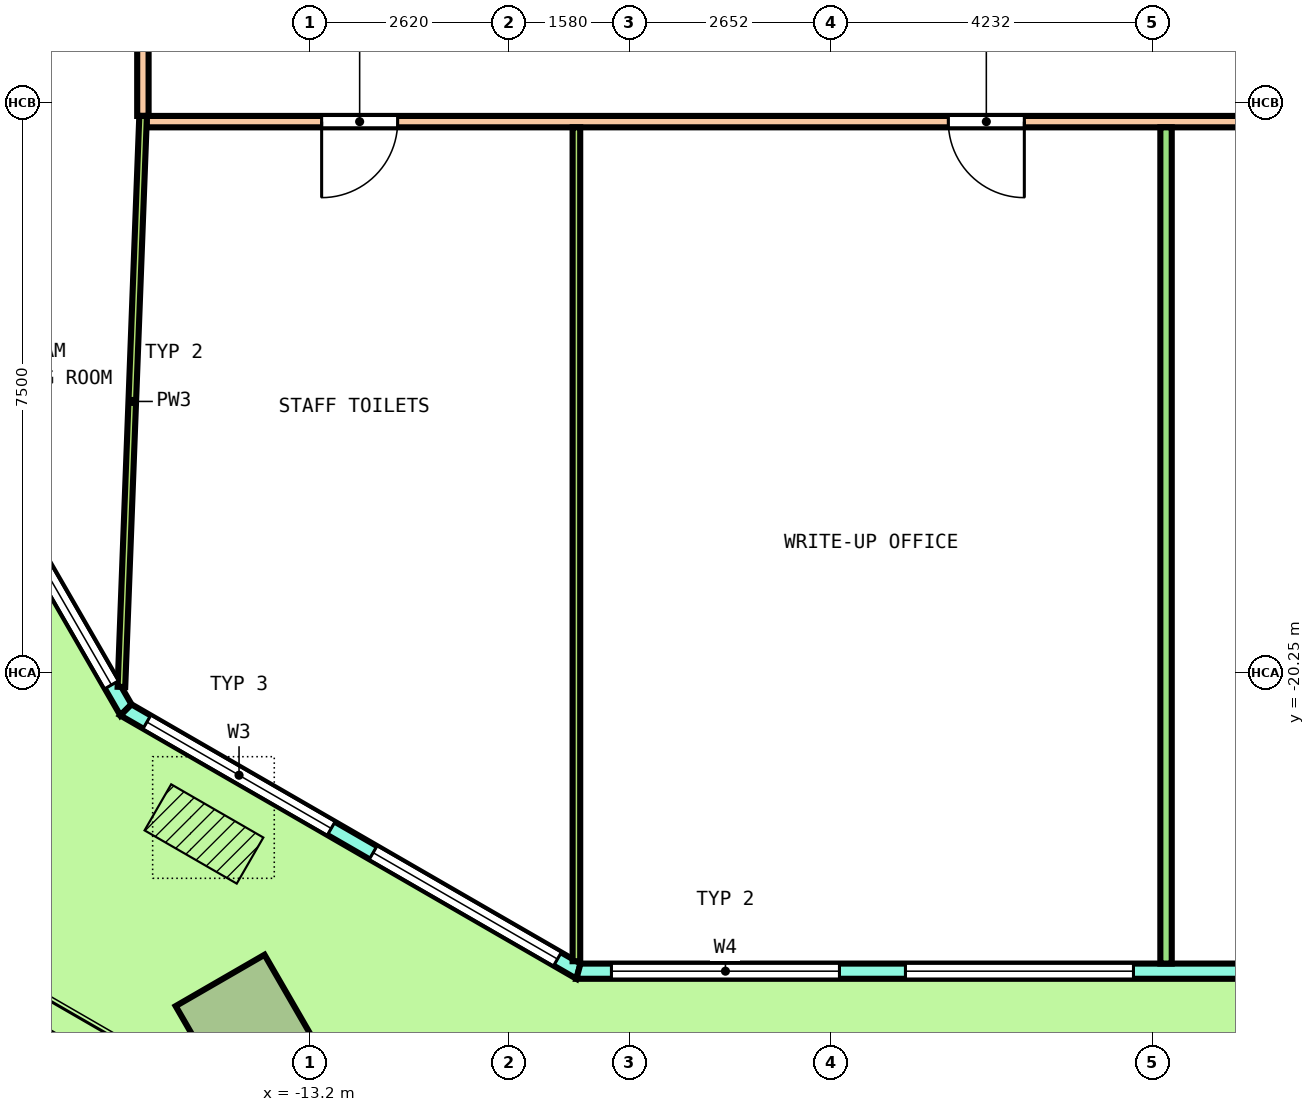
"""IFC4 building model, lengths in metres.
Left out: names, types, materials, properties, quantities, classifications, styles, units other than length and angle.
Written with IfcOpenShell. Run it as: python <this file> out.ifc"""

import sys

from ifc_helpers import new_model, si_unit, direction, frame, frame_2d, origin, origin_2d, place, context, subcontext, project, spatial, polyline, rectangle, outline, extrude, element, fill, save


model = new_model("IFC4")
c1 = context("Model", 3, precision=1e-05, world=origin(), true_north=direction((0.0, 1.0)))
c2 = subcontext(c1, "Body", "Model", "MODEL_VIEW")
j1 = project(units=[si_unit("LENGTHUNIT", "METRE"), si_unit("PLANEANGLEUNIT", "RADIAN")], contexts=[c1])
p1 = place(None, origin())
s1 = spatial("IfcSite", under=j1, at=p1, CompositionType="ELEMENT")
p2 = place(p1, origin())
s2 = spatial("IfcBuilding", under=s1, at=p2, CompositionType="ELEMENT")
p3 = place(p2, frame((0.0, 0.0, 89.6)))
s3 = spatial("IfcBuildingStorey", under=s2, at=p3, CompositionType="ELEMENT", Elevation=89.6)
p4 = place(p3, frame((-14.047, -24.883, 0.0), z_axis=(0.018133721723, -0.031387604711, 0.999342777233), x_axis=(0.86599921333, -0.499059227482, -0.031388691869)))
e1 = element("IfcColumn", 1, at=p4, inside=s3, PredefinedType="COLUMN", context=c2, shape_type="SweptSolid", body=[
    extrude(rectangle(XDim=1.35, YDim=1.35, at=origin_2d()), origin(), (0.0, 0.0, 1.0), 4.052),
])
p5 = place(p3, frame((-25.772, -3.161, 0.0), z_axis=(0.0, 0.0, 1.0), x_axis=(0.500001833672, -0.866024345111, 0.0)))
e2 = element("IfcWall", 2, at=p5, inside=s3, PredefinedType="SOLIDWALL", context=c2, shape_type="SweptSolid", body=[
    extrude(outline(polyline([(-0.027, -0.1), (0.991, -0.1), (2.008, -0.1), (3.026, -0.1), (4.043, -0.1), (5.061, -0.1), (6.079, -0.1), (7.096, -0.1), (8.114, -0.1), (9.131, -0.1), (10.149, -0.1), (11.167, -0.1), (12.184, -0.1), (13.202, -0.1), (14.219, -0.1), (15.237, -0.1), (16.254, -0.1), (17.272, -0.1), (18.29, -0.1), (19.307, -0.1), (20.325, -0.1), (20.271, 0.1), (19.259, 0.1), (18.247, 0.1), (17.234, 0.1), (16.222, 0.1), (15.21, 0.1), (14.198, 0.1), (13.186, 0.1), (12.173, 0.1), (11.161, 0.1), (10.149, 0.1), (9.137, 0.1), (8.125, 0.1), (7.112, 0.1), (6.1, 0.1), (5.088, 0.1), (4.076, 0.1), (3.063, 0.1), (2.051, 0.1), (1.039, 0.1), (0.027, 0.1), (-0.027, -0.1)])), origin(), (0.0, 0.0, 1.0), 4.1),
])
p6 = place(p5, frame((0.38, 0.0, 0.1)))
e3 = element("IfcOpeningElement", 3, at=p6, cuts=e2, PredefinedType="OPENING", context=c2, shape_type="SweptSolid", body=[
    extrude(rectangle(XDim=3.3, YDim=2.9, at=frame_2d((1.65, 1.45))), frame((0.0, 0.11, 0.0), z_axis=(0.0, -1.0, 0.0), x_axis=(1.0, 0.0, 0.0)), (0.0, 0.0, 1.0), 0.22),
])
p7 = place(p5, frame((4.439, 0.0, 0.1)))
e4 = element("IfcOpeningElement", 4, at=p7, cuts=e2, PredefinedType="OPENING", context=c2, shape_type="SweptSolid", body=[
    extrude(rectangle(XDim=3.3, YDim=2.9, at=frame_2d((1.65, 1.45))), frame((0.0, 0.11, 0.0), z_axis=(0.0, -1.0, 0.0), x_axis=(1.0, 0.0, 0.0)), (0.0, 0.0, 1.0), 0.22),
])
p8 = place(p5, frame((9.249, 0.0, 0.0)))
e5 = element("IfcOpeningElement", 5, at=p8, cuts=e2, PredefinedType="OPENING", context=c2, shape_type="SweptSolid", body=[
    extrude(rectangle(XDim=1.8, YDim=2.4, at=frame_2d((0.9, 1.2))), frame((0.0, 0.11, 0.0), z_axis=(0.0, -1.0, 0.0), x_axis=(1.0, 0.0, 0.0)), (0.0, 0.0, 1.0), 0.22),
])
p9 = place(p5, frame((9.249, 0.0, 2.55)))
e6 = element("IfcOpeningElement", 6, at=p9, cuts=e2, PredefinedType="OPENING", context=c2, shape_type="SweptSolid", body=[
    extrude(rectangle(XDim=1.8, YDim=0.45, at=frame_2d((0.9, 0.225))), frame((0.0, 0.11, 0.0), z_axis=(0.0, -1.0, 0.0), x_axis=(1.0, 0.0, 0.0)), (0.0, 0.0, 1.0), 0.22),
])
p10 = place(p5, frame((12.559, 0.0, 0.1)))
e7 = element("IfcOpeningElement", 7, at=p10, cuts=e2, PredefinedType="OPENING", context=c2, shape_type="SweptSolid", body=[
    extrude(rectangle(XDim=3.3, YDim=2.9, at=frame_2d((1.65, 1.45))), frame((0.0, 0.11, 0.0), z_axis=(0.0, -1.0, 0.0), x_axis=(1.0, 0.0, 0.0)), (0.0, 0.0, 1.0), 0.22),
])
p11 = place(p5, frame((16.618, 0.0, 0.1)))
e8 = element("IfcOpeningElement", 8, at=p11, cuts=e2, PredefinedType="OPENING", context=c2, shape_type="SweptSolid", body=[
    extrude(rectangle(XDim=3.3, YDim=2.9, at=frame_2d((1.65, 1.45))), frame((0.0, 0.11, 0.0), z_axis=(0.0, -1.0, 0.0), x_axis=(1.0, 0.0, 0.0)), (0.0, 0.0, 1.0), 0.22),
])
p12 = place(p3, frame((-15.624, -20.739, 0.0), z_axis=(0.0, 0.0, 1.0), x_axis=(0.866029458321, -0.49999297727, 0.0)))
e9 = element("IfcWall", 9, at=p12, inside=s3, PredefinedType="SOLIDWALL", context=c2, shape_type="SweptSolid", body=[
    extrude(outline(polyline([(-0.027, -0.1), (1.128, -0.1), (2.282, -0.1), (3.437, -0.1), (4.592, -0.1), (5.747, -0.1), (6.901, -0.1), (6.848, 0.1), (5.711, 0.1), (4.574, 0.1), (3.437, 0.1), (2.301, 0.1), (1.164, 0.1), (0.027, 0.1), (-0.027, -0.1)])), origin(), (0.0, 0.0, 1.0), 4.1),
])
p13 = place(p12, frame((0.319, 0.0, 0.1)))
e10 = element("IfcOpeningElement", 10, at=p13, cuts=e9, PredefinedType="OPENING", context=c2, shape_type="SweptSolid", body=[
    extrude(rectangle(XDim=2.8, YDim=2.9, at=frame_2d((1.4, 1.45))), frame((0.0, 0.11, 0.0), z_axis=(0.0, -1.0, 0.0), x_axis=(1.0, 0.0, 0.0)), (0.0, 0.0, 1.0), 0.22),
])
p14 = place(p12, frame((3.756, 0.0, 0.1)))
e11 = element("IfcOpeningElement", 11, at=p14, cuts=e9, PredefinedType="OPENING", context=c2, shape_type="SweptSolid", body=[
    extrude(rectangle(XDim=2.8, YDim=2.9, at=frame_2d((1.4, 1.45))), frame((0.0, 0.11, 0.0), z_axis=(0.0, -1.0, 0.0), x_axis=(1.0, 0.0, 0.0)), (0.0, 0.0, 1.0), 0.22),
])
p15 = place(p3, frame((-9.67, -24.177, 0.0), z_axis=(0.0, 0.0, 1.0), x_axis=(1.0, 0.0, 0.0)))
e12 = element("IfcWall", 12, at=p15, inside=s3, PredefinedType="SOLIDWALL", context=c2, shape_type="SweptSolid", body=[
    extrude(outline(polyline([(-0.027, -0.1), (0.994, -0.1), (2.015, -0.1), (3.035, -0.1), (4.056, -0.1), (5.077, -0.1), (6.097, -0.1), (7.118, -0.1), (8.139, -0.1), (9.16, -0.1), (10.18, -0.1), (11.201, -0.1), (12.222, -0.1), (13.242, -0.1), (14.263, -0.1), (15.284, -0.1), (16.304, -0.1), (17.325, -0.1), (18.346, -0.1), (19.367, -0.1), (19.313, 0.1), (18.298, 0.1), (17.283, 0.1), (16.268, 0.1), (15.253, 0.1), (14.238, 0.1), (13.223, 0.1), (12.208, 0.1), (11.193, 0.1), (10.177, 0.1), (9.162, 0.1), (8.147, 0.1), (7.132, 0.1), (6.117, 0.1), (5.102, 0.1), (4.087, 0.1), (3.072, 0.1), (2.057, 0.1), (1.042, 0.1), (0.027, 0.1), (-0.027, -0.1)])), origin(), (0.0, 0.0, 1.0), 4.1),
])
p16 = place(p15, frame((0.434, 0.0, 0.1)))
e13 = element("IfcOpeningElement", 13, at=p16, cuts=e12, PredefinedType="OPENING", context=c2, shape_type="SweptSolid", body=[
    extrude(rectangle(XDim=3.0, YDim=2.9, at=frame_2d((1.5, 1.45))), frame((0.0, 0.11, 0.0), z_axis=(0.0, -1.0, 0.0), x_axis=(1.0, 0.0, 0.0)), (0.0, 0.0, 1.0), 0.22),
])
p17 = place(p15, frame((4.302, 0.0, 0.1)))
e14 = element("IfcOpeningElement", 14, at=p17, cuts=e12, PredefinedType="OPENING", context=c2, shape_type="SweptSolid", body=[
    extrude(rectangle(XDim=3.0, YDim=2.9, at=frame_2d((1.5, 1.45))), frame((0.0, 0.11, 0.0), z_axis=(0.0, -1.0, 0.0), x_axis=(1.0, 0.0, 0.0)), (0.0, 0.0, 1.0), 0.22),
])
p18 = place(p15, frame((8.77, 0.0, 0.0)))
e15 = element("IfcOpeningElement", 15, at=p18, cuts=e12, PredefinedType="OPENING", context=c2, shape_type="SweptSolid", body=[
    extrude(rectangle(XDim=1.8, YDim=2.4, at=frame_2d((0.9, 1.2))), frame((0.0, 0.11, 0.0), z_axis=(0.0, -1.0, 0.0), x_axis=(1.0, 0.0, 0.0)), (0.0, 0.0, 1.0), 0.22),
])
p19 = place(p15, frame((8.77, 0.0, 2.55)))
e16 = element("IfcOpeningElement", 16, at=p19, cuts=e12, PredefinedType="OPENING", context=c2, shape_type="SweptSolid", body=[
    extrude(rectangle(XDim=1.8, YDim=0.45, at=frame_2d((0.9, 0.225))), frame((0.0, 0.11, 0.0), z_axis=(0.0, -1.0, 0.0), x_axis=(1.0, 0.0, 0.0)), (0.0, 0.0, 1.0), 0.22),
])
p20 = place(p15, frame((12.038, 0.0, 0.1)))
e17 = element("IfcOpeningElement", 17, at=p20, cuts=e12, PredefinedType="OPENING", context=c2, shape_type="SweptSolid", body=[
    extrude(rectangle(XDim=3.0, YDim=2.9, at=frame_2d((1.5, 1.45))), frame((0.0, 0.11, 0.0), z_axis=(0.0, -1.0, 0.0), x_axis=(1.0, 0.0, 0.0)), (0.0, 0.0, 1.0), 0.22),
])
p21 = place(p15, frame((15.906, 0.0, 0.1)))
e18 = element("IfcOpeningElement", 18, at=p21, cuts=e12, PredefinedType="OPENING", context=c2, shape_type="SweptSolid", body=[
    extrude(rectangle(XDim=3.0, YDim=2.9, at=frame_2d((1.5, 1.45))), frame((0.0, 0.11, 0.0), z_axis=(0.0, -1.0, 0.0), x_axis=(1.0, 0.0, 0.0)), (0.0, 0.0, 1.0), 0.22),
])
p22 = place(p3, frame((-15.4, -12.925, 0.0), z_axis=(0.0, 0.0, 1.0), x_axis=(0.0, 1.0, 0.0)))
e19 = element("IfcWall", 19, at=p22, inside=s3, PredefinedType="PARTITIONING", context=c2, shape_type="SweptSolid", body=[
    extrude(rectangle(XDim=25.85, YDim=0.15, at=frame_2d((12.925, 0.0))), origin(), (0.0, 0.0, 1.0), 3.05),
])
p23 = place(p22, frame((21.375, 0.0, 0.0)))
e20 = element("IfcOpeningElement", 20, at=p23, cuts=e19, PredefinedType="OPENING", context=c2, shape_type="SweptSolid", body=[
    extrude(rectangle(XDim=1.2, YDim=2.1, at=frame_2d((0.6, 1.05))), frame((0.0, 0.085, 0.0), z_axis=(0.0, -1.0, 0.0), x_axis=(1.0, 0.0, 0.0)), (0.0, 0.0, 1.0), 0.17),
])
p24 = place(p22, frame((15.497, 0.0, 0.0)))
e21 = element("IfcOpeningElement", 21, at=p24, cuts=e19, PredefinedType="OPENING", context=c2, shape_type="SweptSolid", body=[
    extrude(rectangle(XDim=1.2, YDim=2.1, at=frame_2d((0.6, 1.05))), frame((0.0, 0.085, 0.0), z_axis=(0.0, -1.0, 0.0), x_axis=(1.0, 0.0, 0.0)), (0.0, 0.0, 1.0), 0.17),
])
p25 = place(p22, frame((3.566, 0.0, 0.0)))
e22 = element("IfcOpeningElement", 22, at=p25, cuts=e19, PredefinedType="OPENING", context=c2, shape_type="SweptSolid", body=[
    extrude(rectangle(XDim=1.2, YDim=2.1, at=frame_2d((0.6, 1.05))), frame((0.0, 0.085, 0.0), z_axis=(0.0, -1.0, 0.0), x_axis=(1.0, 0.0, 0.0)), (0.0, 0.0, 1.0), 0.17),
])
p26 = place(p3, frame((-15.35, -13.0, 0.0), z_axis=(0.0, 0.0, 1.0), x_axis=(1.0, 0.0, 0.0)))
e23 = element("IfcWall", 23, at=p26, inside=s3, PredefinedType="PARTITIONING", context=c2, shape_type="SweptSolid", body=[
    extrude(rectangle(XDim=30.7, YDim=0.15, at=frame_2d((15.35, 0.0))), origin(), (0.0, 0.0, 1.0), 3.05),
])
p27 = place(p26, frame((2.302, 0.0, 0.0)))
e24 = element("IfcOpeningElement", 24, at=p27, cuts=e23, PredefinedType="OPENING", context=c2, shape_type="SweptSolid", body=[
    extrude(rectangle(XDim=1.0, YDim=2.1, at=frame_2d((0.5, 1.05))), frame((0.0, 0.085, 0.0), z_axis=(0.0, -1.0, 0.0), x_axis=(1.0, 0.0, 0.0)), (0.0, 0.0, 1.0), 0.17),
])
p28 = place(p26, frame((10.546, 0.0, 0.0)))
e25 = element("IfcOpeningElement", 25, at=p28, cuts=e23, PredefinedType="OPENING", context=c2, shape_type="SweptSolid", body=[
    extrude(rectangle(XDim=1.0, YDim=2.1, at=frame_2d((0.5, 1.05))), frame((0.0, 0.085, 0.0), z_axis=(0.0, -1.0, 0.0), x_axis=(1.0, 0.0, 0.0)), (0.0, 0.0, 1.0), 0.17),
])
p29 = place(p26, frame((15.225, 0.0, 0.0)))
e26 = element("IfcOpeningElement", 26, at=p29, cuts=e23, PredefinedType="OPENING", context=c2, shape_type="SweptSolid", body=[
    extrude(rectangle(XDim=1.2, YDim=2.1, at=frame_2d((0.6, 1.05))), frame((0.0, 0.085, 0.0), z_axis=(0.0, -1.0, 0.0), x_axis=(1.0, 0.0, 0.0)), (0.0, 0.0, 1.0), 0.17),
])
p30 = place(p26, frame((22.763, 0.0, 0.0)))
e27 = element("IfcOpeningElement", 27, at=p30, cuts=e23, PredefinedType="OPENING", context=c2, shape_type="SweptSolid", body=[
    extrude(rectangle(XDim=1.2, YDim=2.1, at=frame_2d((0.6, 1.05))), frame((0.0, 0.085, 0.0), z_axis=(0.0, -1.0, 0.0), x_axis=(1.0, 0.0, 0.0)), (0.0, 0.0, 1.0), 0.17),
])
p31 = place(p26, frame((28.748, 0.0, 0.0)))
e28 = element("IfcOpeningElement", 28, at=p31, cuts=e23, PredefinedType="OPENING", context=c2, shape_type="SweptSolid", body=[
    extrude(rectangle(XDim=1.0, YDim=2.1, at=frame_2d((0.5, 1.05))), frame((0.0, 0.085, 0.0), z_axis=(0.0, -1.0, 0.0), x_axis=(1.0, 0.0, 0.0)), (0.0, 0.0, 1.0), 0.17),
])
p32 = place(p3, frame((-1.939, -24.077, 0.0), z_axis=(0.0, 0.0, 1.0), x_axis=(0.0, 1.0, 0.0)))
e29 = element("IfcWall", 29, at=p32, inside=s3, PredefinedType="PARTITIONING", context=c2, shape_type="SweptSolid", body=[
    extrude(rectangle(XDim=11.002, YDim=0.15, at=frame_2d((5.501, 0.0))), origin(), (0.0, 0.0, 1.0), 3.05),
])
p33 = place(p3, frame((-15.683, -20.437, 0.0), z_axis=(0.0, 0.0, 1.0), x_axis=(0.03796539422, 0.99927905454, 0.0)))
e30 = element("IfcWall", 30, at=p33, inside=s3, PredefinedType="PARTITIONING", context=c2, shape_type="SweptSolid", body=[
    extrude(rectangle(XDim=7.517, YDim=0.1, at=frame_2d((3.759, 0.0))), origin(), (0.0, 0.0, 1.0), 3.05),
])
p34 = place(p3, frame((-9.697, -24.046, 0.0), z_axis=(0.0, 0.0, 1.0), x_axis=(0.0, 1.0, 0.0)))
e31 = element("IfcWall", 31, at=p34, inside=s3, PredefinedType="PARTITIONING", context=c2, shape_type="SweptSolid", body=[
    extrude(rectangle(XDim=10.971, YDim=0.1, at=frame_2d((5.485, 0.0))), origin(), (0.0, 0.0, 1.0), 3.05),
])
p35 = place(p11, origin())
e32 = element("IfcWindow", 32, at=p35, inside=s3, PartitioningType="SINGLE_PANEL", PredefinedType="WINDOW", context=c2, shape_type="SweptSolid", body=[
    extrude(rectangle(XDim=3.3, YDim=2.9, at=frame_2d((1.65, 1.45))), frame((0.0, 0.03, 0.0), z_axis=(0.0, -1.0, 0.0), x_axis=(1.0, 0.0, 0.0)), (0.0, 0.0, 1.0), 0.06),
])
fill(e8, e32)
p36 = place(p13, origin())
e33 = element("IfcWindow", 33, at=p36, inside=s3, PartitioningType="SINGLE_PANEL", PredefinedType="WINDOW", context=c2, shape_type="SweptSolid", body=[
    extrude(rectangle(XDim=2.8, YDim=2.9, at=frame_2d((1.4, 1.45))), frame((0.0, 0.03, 0.0), z_axis=(0.0, -1.0, 0.0), x_axis=(1.0, 0.0, 0.0)), (0.0, 0.0, 1.0), 0.06),
])
fill(e10, e33)
p37 = place(p14, origin())
e34 = element("IfcWindow", 34, at=p37, inside=s3, PartitioningType="SINGLE_PANEL", PredefinedType="WINDOW", context=c2, shape_type="SweptSolid", body=[
    extrude(rectangle(XDim=2.8, YDim=2.9, at=frame_2d((1.4, 1.45))), frame((0.0, 0.03, 0.0), z_axis=(0.0, -1.0, 0.0), x_axis=(1.0, 0.0, 0.0)), (0.0, 0.0, 1.0), 0.06),
])
fill(e11, e34)
p38 = place(p16, origin())
e35 = element("IfcWindow", 35, at=p38, inside=s3, PartitioningType="SINGLE_PANEL", PredefinedType="WINDOW", context=c2, shape_type="SweptSolid", body=[
    extrude(rectangle(XDim=3.0, YDim=2.9, at=frame_2d((1.5, 1.45))), frame((0.0, 0.03, 0.0), z_axis=(0.0, -1.0, 0.0), x_axis=(1.0, 0.0, 0.0)), (0.0, 0.0, 1.0), 0.06),
])
fill(e13, e35)
p39 = place(p17, origin())
e36 = element("IfcWindow", 36, at=p39, inside=s3, PartitioningType="SINGLE_PANEL", PredefinedType="WINDOW", context=c2, shape_type="SweptSolid", body=[
    extrude(rectangle(XDim=3.0, YDim=2.9, at=frame_2d((1.5, 1.45))), frame((0.0, 0.03, 0.0), z_axis=(0.0, -1.0, 0.0), x_axis=(1.0, 0.0, 0.0)), (0.0, 0.0, 1.0), 0.06),
])
fill(e14, e36)
p40 = place(p27, origin())
e37 = element("IfcDoor", 37, at=p40, inside=s3, OperationType="SINGLE_SWING_LEFT", PredefinedType="DOOR", context=c2, shape_type="SweptSolid", body=[
    extrude(rectangle(XDim=1.0, YDim=2.1, at=frame_2d((0.5, 1.05))), frame((0.0, 0.025, 0.0), z_axis=(0.0, -1.0, 0.0), x_axis=(1.0, 0.0, 0.0)), (0.0, 0.0, 1.0), 0.05),
])
fill(e24, e37)
p41 = place(p28, origin())
e38 = element("IfcDoor", 38, at=p41, inside=s3, OperationType="SINGLE_SWING_LEFT", PredefinedType="DOOR", context=c2, shape_type="SweptSolid", body=[
    extrude(rectangle(XDim=1.0, YDim=2.1, at=frame_2d((0.5, 1.05))), frame((0.0, 0.025, 0.0), z_axis=(0.0, -1.0, 0.0), x_axis=(1.0, 0.0, 0.0)), (0.0, 0.0, 1.0), 0.05),
])
fill(e25, e38)
save(model, sys.argv[1])
